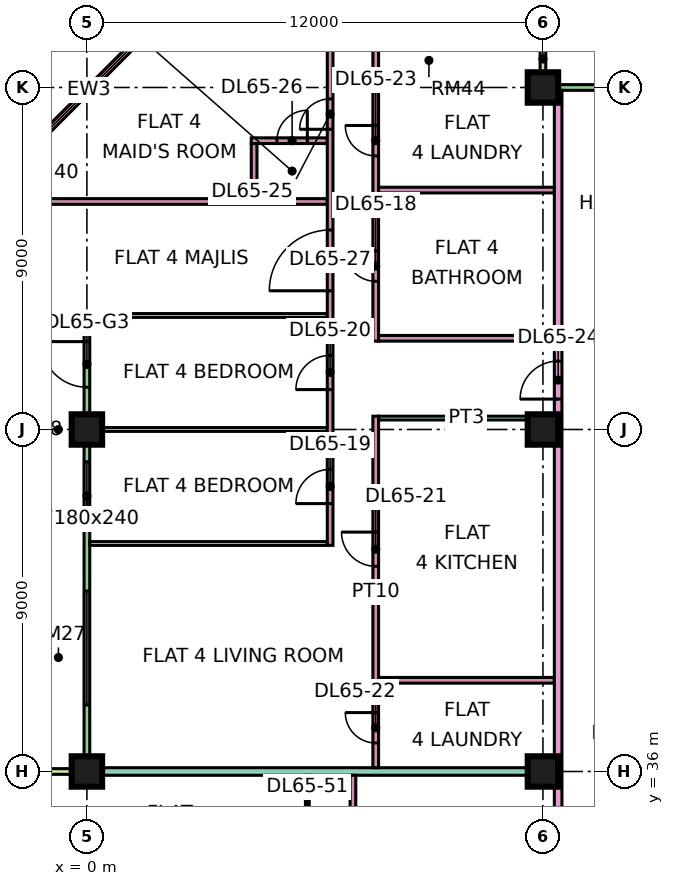
"""IFC4 building model, lengths in metres.
Left out: names, types, materials, properties, quantities, classifications, styles, units other than length and angle.
Written with IfcOpenShell. Run it as: python <this file> out.ifc"""

import sys

from ifc_helpers import new_model, si_unit, direction, frame, frame_2d, origin, origin_2d, place, context, subcontext, project, spatial, rectangle, extrude, element, fill, save


model = new_model("IFC4")
c1 = context("Model", 3, precision=1e-05, world=origin(), true_north=direction((0.0, 1.0)))
c2 = subcontext(c1, "Body", "Model", "MODEL_VIEW")
j1 = project(units=[si_unit("LENGTHUNIT", "METRE"), si_unit("PLANEANGLEUNIT", "RADIAN")], contexts=[c1])
p1 = place(None, origin())
s1 = spatial("IfcSite", under=j1, at=p1, CompositionType="ELEMENT")
p2 = place(p1, origin())
s2 = spatial("IfcBuilding", under=s1, at=p2, CompositionType="ELEMENT")
p3 = place(p2, frame((0.0, 0.0, 280.9)))
s3 = spatial("IfcBuildingStorey", under=s2, at=p3, CompositionType="ELEMENT", Elevation=280.9)
p4 = place(p3, frame((0.0, 36.0, 0.0), z_axis=(0.0, 0.0, 1.0), x_axis=(1.0, 0.0, 0.0)))
e1 = element("IfcColumn", 1, at=p4, inside=s3, PredefinedType="COLUMN", context=c2, shape_type="SweptSolid", body=[
    extrude(rectangle(XDim=0.8, YDim=0.8, at=origin_2d()), origin(), (0.0, 0.0, 1.0), 3.75),
])
for number, where, z_axis, x_axis in (
    (2, (0.0, 45.0, 0.0), (0.0, 0.0, 1.0), (1.0, 0.0, 0.0)),
    (3, (12.0, 36.0, 0.0), (0.0, 0.0, 1.0), (1.0, 0.0, 0.0)),
    (4, (12.0, 45.0, 0.0), (0.0, 0.0, 1.0), (1.0, 0.0, 0.0)),
    (5, (12.0, 54.0, 0.0), (0.0, 0.0, 1.0), (1.0, 0.0, 0.0)),
):
    element("IfcColumn", number, at=place(p3, frame(where, z_axis=z_axis, x_axis=x_axis)), inside=s3, PredefinedType="COLUMN", context=c2, shape_type="SweptSolid", body=[
        extrude(rectangle(XDim=0.8, YDim=0.8, at=origin_2d()), origin(), (0.0, 0.0, 1.0), 3.75),
    ])
p5 = place(p3, frame((22.425, 54.0, 0.0), z_axis=(0.0, 0.0, 1.0), x_axis=(-1.0, 0.0, 0.0)))
e6 = element("IfcWall", 6, at=p5, inside=s3, PredefinedType="SOLIDWALL", context=c2, shape_type="SweptSolid", body=[
    extrude(rectangle(XDim=10.35, YDim=0.15, at=frame_2d((5.175, 0.0))), origin(), (0.0, 0.0, 1.0), 3.35),
])
p6 = place(p5, frame((1.012, 0.0, 0.45)))
e7 = element("IfcOpeningElement", 7, at=p6, cuts=e6, PredefinedType="OPENING", context=c2, shape_type="SweptSolid", body=[
    extrude(rectangle(XDim=4.8, YDim=2.4, at=frame_2d((2.4, 1.2))), frame((0.0, 0.085, 0.0), z_axis=(0.0, -1.0, 0.0), x_axis=(1.0, 0.0, 0.0)), (0.0, 0.0, 1.0), 0.17),
])
p7 = place(p3, frame((12.0, 55.5, 0.0), z_axis=(0.0, 0.0, 1.0), x_axis=(0.0, -1.0, 0.0)))
e8 = element("IfcWall", 8, at=p7, inside=s3, PredefinedType="SOLIDWALL", context=c2, shape_type="SweptSolid", body=[
    extrude(rectangle(XDim=1.5, YDim=0.15, at=frame_2d((0.75, 0.0))), origin(), (0.0, 0.0, 1.0), 3.35),
])
p8 = place(p3, frame((1.553, 55.447, 0.0), z_axis=(0.0, 0.0, 1.0), x_axis=(-0.707106781187, -0.707106781187, 0.0)))
e9 = element("IfcWall", 9, at=p8, inside=s3, PredefinedType="SOLIDWALL", context=c2, shape_type="SweptSolid", body=[
    extrude(rectangle(XDim=4.243, YDim=0.15, at=frame_2d((2.121, 0.0))), origin(), (0.0, 0.0, 1.0), 3.35),
])
p9 = place(p8, frame((0.621, 0.0, 0.45)))
e10 = element("IfcOpeningElement", 10, at=p9, cuts=e9, PredefinedType="OPENING", context=c2, shape_type="SweptSolid", body=[
    extrude(rectangle(XDim=3.0, YDim=2.4, at=frame_2d((1.5, 1.2))), frame((0.0, 0.085, 0.0), z_axis=(0.0, -1.0, 0.0), x_axis=(1.0, 0.0, 0.0)), (0.0, 0.0, 1.0), 0.17),
])
p10 = place(p3, frame((0.0, 47.925, 0.0), z_axis=(0.0, 0.0, 1.0), x_axis=(0.0, -1.0, 0.0)))
e11 = element("IfcWall", 11, at=p10, inside=s3, PredefinedType="SOLIDWALL", context=c2, shape_type="SweptSolid", body=[
    extrude(rectangle(XDim=11.85, YDim=0.15, at=frame_2d((5.925, 0.0))), origin(), (0.0, 0.0, 1.0), 3.35),
])
p11 = place(p10, frame((0.613, 0.0, 0.0)))
e12 = element("IfcOpeningElement", 12, at=p11, cuts=e11, PredefinedType="OPENING", context=c2, shape_type="SweptSolid", body=[
    extrude(rectangle(XDim=1.2, YDim=2.4, at=frame_2d((0.6, 1.2))), frame((0.0, 0.085, 0.0), z_axis=(0.0, -1.0, 0.0), x_axis=(1.0, 0.0, 0.0)), (0.0, 0.0, 1.0), 0.17),
])
p12 = place(p10, frame((3.775, 0.0, 0.45)))
e13 = element("IfcOpeningElement", 13, at=p12, cuts=e11, PredefinedType="OPENING", context=c2, shape_type="SweptSolid", body=[
    extrude(rectangle(XDim=1.8, YDim=2.4, at=frame_2d((0.9, 1.2))), frame((0.0, 0.085, 0.0), z_axis=(0.0, -1.0, 0.0), x_axis=(1.0, 0.0, 0.0)), (0.0, 0.0, 1.0), 0.17),
])
p13 = place(p10, frame((7.175, 0.0, 0.45)))
e14 = element("IfcOpeningElement", 14, at=p13, cuts=e11, PredefinedType="OPENING", context=c2, shape_type="SweptSolid", body=[
    extrude(rectangle(XDim=3.0, YDim=2.4, at=frame_2d((1.5, 1.2))), frame((0.0, 0.085, 0.0), z_axis=(0.0, -1.0, 0.0), x_axis=(1.0, 0.0, 0.0)), (0.0, 0.0, 1.0), 0.17),
])
for number, where, z_axis, x_axis in (
    (15, (-1.5, 48.0, 0.0), (0.0, 0.0, 1.0), (1.0, 0.0, 0.0)),
    (16, (-1.5, 36.0, 0.0), (0.0, 0.0, 1.0), (1.0, 0.0, 0.0)),
):
    element("IfcWall", number, at=place(p3, frame(where, z_axis=z_axis, x_axis=x_axis)), inside=s3, PredefinedType="SOLIDWALL", context=c2, shape_type="SweptSolid", body=[
        extrude(rectangle(XDim=1.5, YDim=0.15, at=frame_2d((0.75, 0.0))), origin(), (0.0, 0.0, 1.0), 3.35),
    ])
p14 = place(p3, frame((-1.351, 51.0, 0.0), z_axis=(0.0, 0.0, 1.0), x_axis=(1.0, 0.0, 0.0)))
e17 = element("IfcWall", 17, at=p14, inside=s3, PredefinedType="PARTITIONING", context=c2, shape_type="SweptSolid", body=[
    extrude(rectangle(XDim=7.676, YDim=0.15, at=frame_2d((3.838, 0.0))), origin(), (0.0, 0.0, 1.0), 3.35),
])
e18 = element("IfcWall", 18, at=p4, inside=s3, PredefinedType="PARTITIONING", context=c2, shape_type="SweptSolid", body=[
    extrude(rectangle(XDim=12.3, YDim=0.2, at=frame_2d((6.15, 0.0))), origin(), (0.0, 0.0, 1.0), 3.35),
])
p15 = place(p3, frame((0.0, 48.0, 0.0), z_axis=(0.0, 0.0, 1.0), x_axis=(1.0, 0.0, 0.0)))
e19 = element("IfcWall", 19, at=p15, inside=s3, PredefinedType="PARTITIONING", context=c2, shape_type="SweptSolid", body=[
    extrude(rectangle(XDim=6.325, YDim=0.1, at=frame_2d((3.163, 0.0))), origin(), (0.0, 0.0, 1.0), 3.35),
])
for number, where, z_axis, x_axis in (
    (20, (0.074, 42.0, 0.0), (0.0, 0.0, 1.0), (1.0, 0.0, 0.0)),
    (21, (0.074, 45.0, 0.0), (0.0, 0.0, 1.0), (1.0, 0.0, 0.0)),
):
    element("IfcWall", number, at=place(p3, frame(where, z_axis=z_axis, x_axis=x_axis)), inside=s3, PredefinedType="PARTITIONING", context=c2, shape_type="SweptSolid", body=[
        extrude(rectangle(XDim=6.251, YDim=0.1, at=frame_2d((3.125, 0.0))), origin(), (0.0, 0.0, 1.0), 3.35),
    ])
p16 = place(p3, frame((4.325, 52.6, 0.0), z_axis=(0.0, 0.0, 1.0), x_axis=(1.0, 0.0, 0.0)))
e22 = element("IfcWall", 22, at=p16, inside=s3, PredefinedType="PARTITIONING", context=c2, shape_type="SweptSolid", body=[
    extrude(rectangle(XDim=2.0, YDim=0.15, at=frame_2d((1.0, 0.0))), origin(), (0.0, 0.0, 1.0), 3.35),
])
p17 = place(p16, frame((0.675, 0.0, 0.0)))
e23 = element("IfcOpeningElement", 23, at=p17, cuts=e22, PredefinedType="OPENING", context=c2, shape_type="SweptSolid", body=[
    extrude(rectangle(XDim=0.8, YDim=2.1, at=frame_2d((0.4, 1.05))), frame((0.0, 0.085, 0.0), z_axis=(0.0, -1.0, 0.0), x_axis=(1.0, 0.0, 0.0)), (0.0, 0.0, 1.0), 0.17),
])
p18 = place(p3, frame((4.4, 51.075, 0.0), z_axis=(0.0, 0.0, 1.0), x_axis=(0.0, 1.0, 0.0)))
e24 = element("IfcWall", 24, at=p18, inside=s3, PredefinedType="PARTITIONING", context=c2, shape_type="SweptSolid", body=[
    extrude(rectangle(XDim=1.45, YDim=0.15, at=frame_2d((0.725, 0.0))), origin(), (0.0, 0.0, 1.0), 3.35),
])
p19 = place(p3, frame((5.8, 29.95, 0.0), z_axis=(0.0, 0.0, 1.0), x_axis=(0.0, 1.0, 0.0)))
e25 = element("IfcWall", 25, at=p19, inside=s3, PredefinedType="PARTITIONING", context=c2, shape_type="SweptSolid", body=[
    extrude(rectangle(XDim=5.95, YDim=0.1, at=frame_2d((2.975, 0.0))), origin(), (0.0, 0.0, 1.0), 3.35),
])
p20 = place(p19, frame((1.1, 0.0, 0.0)))
e26 = element("IfcOpeningElement", 26, at=p20, cuts=e25, PredefinedType="OPENING", context=c2, shape_type="SweptSolid", body=[
    extrude(rectangle(XDim=0.9, YDim=2.1, at=frame_2d((0.45, 1.05))), frame((0.0, 0.06, 0.0), z_axis=(0.0, -1.0, 0.0), x_axis=(1.0, 0.0, 0.0)), (0.0, 0.0, 1.0), 0.12),
])
p21 = place(p19, frame((4.1, 0.0, 0.0)))
e27 = element("IfcOpeningElement", 27, at=p21, cuts=e25, PredefinedType="OPENING", context=c2, shape_type="SweptSolid", body=[
    extrude(rectangle(XDim=0.9, YDim=2.1, at=frame_2d((0.45, 1.05))), frame((0.0, 0.06, 0.0), z_axis=(0.0, -1.0, 0.0), x_axis=(1.0, 0.0, 0.0)), (0.0, 0.0, 1.0), 0.12),
])
p22 = place(p3, frame((6.4, 41.95, 0.0), z_axis=(0.0, 0.0, 1.0), x_axis=(0.0, 1.0, 0.0)))
e28 = element("IfcWall", 28, at=p22, inside=s3, PredefinedType="PARTITIONING", context=c2, shape_type="SweptSolid", body=[
    extrude(rectangle(XDim=13.4, YDim=0.15, at=frame_2d((6.7, 0.0))), origin(), (0.0, 0.0, 1.0), 3.35),
])
p23 = place(p22, frame((1.1, 0.0, 0.0)))
e29 = element("IfcOpeningElement", 29, at=p23, cuts=e28, PredefinedType="OPENING", context=c2, shape_type="SweptSolid", body=[
    extrude(rectangle(XDim=0.9, YDim=2.1, at=frame_2d((0.45, 1.05))), frame((0.0, 0.085, 0.0), z_axis=(0.0, -1.0, 0.0), x_axis=(1.0, 0.0, 0.0)), (0.0, 0.0, 1.0), 0.17),
])
p24 = place(p22, frame((4.1, 0.0, 0.0)))
e30 = element("IfcOpeningElement", 30, at=p24, cuts=e28, PredefinedType="OPENING", context=c2, shape_type="SweptSolid", body=[
    extrude(rectangle(XDim=0.9, YDim=2.1, at=frame_2d((0.45, 1.05))), frame((0.0, 0.085, 0.0), z_axis=(0.0, -1.0, 0.0), x_axis=(1.0, 0.0, 0.0)), (0.0, 0.0, 1.0), 0.17),
])
p25 = place(p22, frame((10.95, 0.0, 0.0)))
e31 = element("IfcOpeningElement", 31, at=p25, cuts=e28, PredefinedType="OPENING", context=c2, shape_type="SweptSolid", body=[
    extrude(rectangle(XDim=0.8, YDim=2.1, at=frame_2d((0.4, 1.05))), frame((0.0, 0.085, 0.0), z_axis=(0.0, -1.0, 0.0), x_axis=(1.0, 0.0, 0.0)), (0.0, 0.0, 1.0), 0.17),
])
p26 = place(p22, frame((6.7, 0.0, 0.0)))
e32 = element("IfcOpeningElement", 32, at=p26, cuts=e28, PredefinedType="OPENING", context=c2, shape_type="SweptSolid", body=[
    extrude(rectangle(XDim=1.6, YDim=2.1, at=frame_2d((0.8, 1.05))), frame((0.0, 0.085, 0.0), z_axis=(0.0, -1.0, 0.0), x_axis=(1.0, 0.0, 0.0)), (0.0, 0.0, 1.0), 0.17),
])
p27 = place(p3, frame((7.0, 27.525, 0.0), z_axis=(0.0, 0.0, 1.0), x_axis=(0.0, 1.0, 0.0)))
e33 = element("IfcWall", 33, at=p27, inside=s3, PredefinedType="PARTITIONING", context=c2, shape_type="SweptSolid", body=[
    extrude(rectangle(XDim=8.375, YDim=0.15, at=frame_2d((4.188, 0.0))), origin(), (0.0, 0.0, 1.0), 3.35),
])
p28 = place(p27, frame((0.525, 0.0, 0.0)))
e34 = element("IfcOpeningElement", 34, at=p28, cuts=e33, PredefinedType="OPENING", context=c2, shape_type="SweptSolid", body=[
    extrude(rectangle(XDim=0.8, YDim=2.1, at=frame_2d((0.4, 1.05))), frame((0.0, 0.085, 0.0), z_axis=(0.0, -1.0, 0.0), x_axis=(1.0, 0.0, 0.0)), (0.0, 0.0, 1.0), 0.17),
])
p29 = place(p27, frame((4.725, 0.0, 0.0)))
e35 = element("IfcOpeningElement", 35, at=p29, cuts=e33, PredefinedType="OPENING", context=c2, shape_type="SweptSolid", body=[
    extrude(rectangle(XDim=0.9, YDim=2.1, at=frame_2d((0.45, 1.05))), frame((0.0, 0.085, 0.0), z_axis=(0.0, -1.0, 0.0), x_axis=(1.0, 0.0, 0.0)), (0.0, 0.0, 1.0), 0.17),
])
p30 = place(p3, frame((7.6, 36.1, 0.0), z_axis=(0.0, 0.0, 1.0), x_axis=(0.0, 1.0, 0.0)))
e36 = element("IfcWall", 36, at=p30, inside=s3, PredefinedType="PARTITIONING", context=c2, shape_type="SweptSolid", body=[
    extrude(rectangle(XDim=9.25, YDim=0.15, at=frame_2d((4.625, 0.0))), origin(), (0.0, 0.0, 1.0), 3.35),
])
p31 = place(p30, frame((5.3, 0.0, 0.0)))
e37 = element("IfcOpeningElement", 37, at=p31, cuts=e36, PredefinedType="OPENING", context=c2, shape_type="SweptSolid", body=[
    extrude(rectangle(XDim=0.9, YDim=2.1, at=frame_2d((0.45, 1.05))), frame((0.0, 0.085, 0.0), z_axis=(0.0, -1.0, 0.0), x_axis=(1.0, 0.0, 0.0)), (0.0, 0.0, 1.0), 0.17),
])
p32 = place(p30, frame((0.65, 0.0, 0.0)))
e38 = element("IfcOpeningElement", 38, at=p32, cuts=e36, PredefinedType="OPENING", context=c2, shape_type="SweptSolid", body=[
    extrude(rectangle(XDim=0.8, YDim=2.1, at=frame_2d((0.4, 1.05))), frame((0.0, 0.085, 0.0), z_axis=(0.0, -1.0, 0.0), x_axis=(1.0, 0.0, 0.0)), (0.0, 0.0, 1.0), 0.17),
])
p33 = place(p3, frame((7.6, 47.325, 0.0), z_axis=(0.0, 0.0, 1.0), x_axis=(0.0, 1.0, 0.0)))
e39 = element("IfcWall", 39, at=p33, inside=s3, PredefinedType="PARTITIONING", context=c2, shape_type="SweptSolid", body=[
    extrude(rectangle(XDim=8.025, YDim=0.15, at=frame_2d((4.013, 0.0))), origin(), (0.0, 0.0, 1.0), 3.35),
])
p34 = place(p33, frame((1.575, 0.0, 0.0)))
e40 = element("IfcOpeningElement", 40, at=p34, cuts=e39, PredefinedType="OPENING", context=c2, shape_type="SweptSolid", body=[
    extrude(rectangle(XDim=0.8, YDim=2.1, at=frame_2d((0.4, 1.05))), frame((0.0, 0.085, 0.0), z_axis=(0.0, -1.0, 0.0), x_axis=(1.0, 0.0, 0.0)), (0.0, 0.0, 1.0), 0.17),
])
p35 = place(p33, frame((4.875, 0.0, 0.0)))
e41 = element("IfcOpeningElement", 41, at=p35, cuts=e39, PredefinedType="OPENING", context=c2, shape_type="SweptSolid", body=[
    extrude(rectangle(XDim=0.8, YDim=2.1, at=frame_2d((0.4, 1.05))), frame((0.0, 0.085, 0.0), z_axis=(0.0, -1.0, 0.0), x_axis=(1.0, 0.0, 0.0)), (0.0, 0.0, 1.0), 0.17),
])
p36 = place(p3, frame((7.675, 38.4, 0.0), z_axis=(0.0, 0.0, 1.0), x_axis=(1.0, 0.0, 0.0)))
e42 = element("IfcWall", 42, at=p36, inside=s3, PredefinedType="PARTITIONING", context=c2, shape_type="SweptSolid", body=[
    extrude(rectangle(XDim=4.625, YDim=0.15, at=frame_2d((2.312, 0.0))), origin(), (0.0, 0.0, 1.0), 3.35),
])
p37 = place(p3, frame((7.675, 45.3, 0.0), z_axis=(0.0, 0.0, 1.0), x_axis=(1.0, 0.0, 0.0)))
e43 = element("IfcWall", 43, at=p37, inside=s3, PredefinedType="PARTITIONING", context=c2, shape_type="SweptSolid", body=[
    extrude(rectangle(XDim=4.625, YDim=0.1, at=frame_2d((2.312, 0.0))), origin(), (0.0, 0.0, 1.0), 3.35),
])
for number, where, z_axis, x_axis in (
    (44, (7.675, 47.4, 0.0), (0.0, 0.0, 1.0), (1.0, 0.0, 0.0)),
    (45, (7.675, 51.3, 0.0), (0.0, 0.0, 1.0), (1.0, 0.0, 0.0)),
):
    element("IfcWall", number, at=place(p3, frame(where, z_axis=z_axis, x_axis=x_axis)), inside=s3, PredefinedType="PARTITIONING", context=c2, shape_type="SweptSolid", body=[
        extrude(rectangle(XDim=4.625, YDim=0.15, at=frame_2d((2.312, 0.0))), origin(), (0.0, 0.0, 1.0), 3.35),
    ])
p38 = place(p3, frame((12.4, 20.0, 0.0), z_axis=(0.0, 0.0, 1.0), x_axis=(0.0, 1.0, 0.0)))
e46 = element("IfcWall", 46, at=p38, inside=s3, PredefinedType="PARTITIONING", context=c2, shape_type="SweptSolid", body=[
    extrude(rectangle(XDim=33.926, YDim=0.2, at=frame_2d((16.963, 0.0))), origin(), (0.0, 0.0, 1.0), 3.35),
])
p39 = place(p38, frame((25.8, 0.0, 0.0)))
e47 = element("IfcOpeningElement", 47, at=p39, cuts=e46, PredefinedType="OPENING", context=c2, shape_type="SweptSolid", body=[
    extrude(rectangle(XDim=1.0, YDim=2.1, at=frame_2d((0.5, 1.05))), frame((0.0, 0.11, 0.0), z_axis=(0.0, -1.0, 0.0), x_axis=(1.0, 0.0, 0.0)), (0.0, 0.0, 1.0), 0.22),
])
p40 = place(p38, frame((0.6, 0.0, 0.0)))
e48 = element("IfcOpeningElement", 48, at=p40, cuts=e46, PredefinedType="OPENING", context=c2, shape_type="SweptSolid", body=[
    extrude(rectangle(XDim=1.2, YDim=2.1, at=frame_2d((0.6, 1.05))), frame((0.0, 0.11, 0.0), z_axis=(0.0, -1.0, 0.0), x_axis=(1.0, 0.0, 0.0)), (0.0, 0.0, 1.0), 0.22),
])
p41 = place(p38, frame((4.5, 0.0, 0.0)))
e49 = element("IfcOpeningElement", 49, at=p41, cuts=e46, PredefinedType="OPENING", context=c2, shape_type="SweptSolid", body=[
    extrude(rectangle(XDim=1.0, YDim=2.1, at=frame_2d((0.5, 1.05))), frame((0.0, 0.11, 0.0), z_axis=(0.0, -1.0, 0.0), x_axis=(1.0, 0.0, 0.0)), (0.0, 0.0, 1.0), 0.22),
])
p42 = place(p9, origin())
e50 = element("IfcWindow", 50, at=p42, inside=s3, PartitioningType="SINGLE_PANEL", PredefinedType="WINDOW", context=c2, shape_type="SweptSolid", body=[
    extrude(rectangle(XDim=3.0, YDim=2.4, at=frame_2d((1.5, 1.2))), frame((0.0, 0.03, 0.0), z_axis=(0.0, -1.0, 0.0), x_axis=(1.0, 0.0, 0.0)), (0.0, 0.0, 1.0), 0.06),
])
fill(e10, e50)
p43 = place(p11, frame((1.2, 0.0, 0.0), z_axis=(0.0, 0.0, 1.0), x_axis=(-1.0, 0.0, 0.0)))
e51 = element("IfcDoor", 51, at=p43, inside=s3, OperationType="DOUBLE_DOOR_SINGLE_SWING", PredefinedType="DOOR", context=c2, shape_type="SweptSolid", body=[
    extrude(rectangle(XDim=1.2, YDim=2.4, at=frame_2d((0.6, 1.2))), frame((0.0, 0.025, 0.0), z_axis=(0.0, -1.0, 0.0), x_axis=(1.0, 0.0, 0.0)), (0.0, 0.0, 1.0), 0.05),
])
fill(e12, e51)
p44 = place(p12, origin())
e52 = element("IfcWindow", 52, at=p44, inside=s3, PartitioningType="SINGLE_PANEL", PredefinedType="WINDOW", context=c2, shape_type="SweptSolid", body=[
    extrude(rectangle(XDim=1.8, YDim=2.4, at=frame_2d((0.9, 1.2))), frame((0.0, 0.03, 0.0), z_axis=(0.0, -1.0, 0.0), x_axis=(1.0, 0.0, 0.0)), (0.0, 0.0, 1.0), 0.06),
])
fill(e13, e52)
p45 = place(p13, origin())
e53 = element("IfcWindow", 53, at=p45, inside=s3, PartitioningType="SINGLE_PANEL", PredefinedType="WINDOW", context=c2, shape_type="SweptSolid", body=[
    extrude(rectangle(XDim=3.0, YDim=2.4, at=frame_2d((1.5, 1.2))), frame((0.0, 0.03, 0.0), z_axis=(0.0, -1.0, 0.0), x_axis=(1.0, 0.0, 0.0)), (0.0, 0.0, 1.0), 0.06),
])
fill(e14, e53)
p46 = place(p34, frame((0.8, 0.0, 0.0), z_axis=(0.0, 0.0, 1.0), x_axis=(-1.0, 0.0, 0.0)))
e54 = element("IfcDoor", 54, at=p46, inside=s3, OperationType="SINGLE_SWING_RIGHT", PredefinedType="DOOR", context=c2, shape_type="SweptSolid", body=[
    extrude(rectangle(XDim=0.8, YDim=2.1, at=frame_2d((0.4, 1.05))), frame((0.0, 0.025, 0.0), z_axis=(0.0, -1.0, 0.0), x_axis=(1.0, 0.0, 0.0)), (0.0, 0.0, 1.0), 0.05),
])
fill(e40, e54)
p47 = place(p23, origin())
e55 = element("IfcDoor", 55, at=p47, inside=s3, OperationType="SINGLE_SWING_LEFT", PredefinedType="DOOR", context=c2, shape_type="SweptSolid", body=[
    extrude(rectangle(XDim=0.9, YDim=2.1, at=frame_2d((0.45, 1.05))), frame((0.0, 0.025, 0.0), z_axis=(0.0, -1.0, 0.0), x_axis=(1.0, 0.0, 0.0)), (0.0, 0.0, 1.0), 0.05),
])
fill(e29, e55)
p48 = place(p24, origin())
e56 = element("IfcDoor", 56, at=p48, inside=s3, OperationType="SINGLE_SWING_LEFT", PredefinedType="DOOR", context=c2, shape_type="SweptSolid", body=[
    extrude(rectangle(XDim=0.9, YDim=2.1, at=frame_2d((0.45, 1.05))), frame((0.0, 0.025, 0.0), z_axis=(0.0, -1.0, 0.0), x_axis=(1.0, 0.0, 0.0)), (0.0, 0.0, 1.0), 0.05),
])
fill(e30, e56)
p49 = place(p31, frame((0.9, 0.0, 0.0), z_axis=(0.0, 0.0, 1.0), x_axis=(-1.0, 0.0, 0.0)))
e57 = element("IfcDoor", 57, at=p49, inside=s3, OperationType="SINGLE_SWING_RIGHT", PredefinedType="DOOR", context=c2, shape_type="SweptSolid", body=[
    extrude(rectangle(XDim=0.9, YDim=2.1, at=frame_2d((0.45, 1.05))), frame((0.0, 0.025, 0.0), z_axis=(0.0, -1.0, 0.0), x_axis=(1.0, 0.0, 0.0)), (0.0, 0.0, 1.0), 0.05),
])
fill(e37, e57)
p50 = place(p32, frame((0.8, 0.0, 0.0), z_axis=(0.0, 0.0, 1.0), x_axis=(-1.0, 0.0, 0.0)))
e58 = element("IfcDoor", 58, at=p50, inside=s3, OperationType="SINGLE_SWING_RIGHT", PredefinedType="DOOR", context=c2, shape_type="SweptSolid", body=[
    extrude(rectangle(XDim=0.8, YDim=2.1, at=frame_2d((0.4, 1.05))), frame((0.0, 0.025, 0.0), z_axis=(0.0, -1.0, 0.0), x_axis=(1.0, 0.0, 0.0)), (0.0, 0.0, 1.0), 0.05),
])
fill(e38, e58)
p51 = place(p35, frame((0.8, 0.0, 0.0), z_axis=(0.0, 0.0, 1.0), x_axis=(-1.0, 0.0, 0.0)))
e59 = element("IfcDoor", 59, at=p51, inside=s3, OperationType="SINGLE_SWING_RIGHT", PredefinedType="DOOR", context=c2, shape_type="SweptSolid", body=[
    extrude(rectangle(XDim=0.8, YDim=2.1, at=frame_2d((0.4, 1.05))), frame((0.0, 0.025, 0.0), z_axis=(0.0, -1.0, 0.0), x_axis=(1.0, 0.0, 0.0)), (0.0, 0.0, 1.0), 0.05),
])
fill(e41, e59)
p52 = place(p39, origin())
e60 = element("IfcDoor", 60, at=p52, inside=s3, OperationType="SINGLE_SWING_LEFT", PredefinedType="DOOR", context=c2, shape_type="SweptSolid", body=[
    extrude(rectangle(XDim=1.0, YDim=2.1, at=frame_2d((0.5, 1.05))), frame((0.0, 0.025, 0.0), z_axis=(0.0, -1.0, 0.0), x_axis=(1.0, 0.0, 0.0)), (0.0, 0.0, 1.0), 0.05),
])
fill(e47, e60)
p53 = place(p25, origin())
e61 = element("IfcDoor", 61, at=p53, inside=s3, OperationType="SINGLE_SWING_LEFT", PredefinedType="DOOR", context=c2, shape_type="SweptSolid", body=[
    extrude(rectangle(XDim=0.8, YDim=2.1, at=frame_2d((0.4, 1.05))), frame((0.0, 0.025, 0.0), z_axis=(0.0, -1.0, 0.0), x_axis=(1.0, 0.0, 0.0)), (0.0, 0.0, 1.0), 0.05),
])
fill(e31, e61)
p54 = place(p17, frame((0.8, 0.0, 0.0), z_axis=(0.0, 0.0, 1.0), x_axis=(-1.0, 0.0, 0.0)))
e62 = element("IfcDoor", 62, at=p54, inside=s3, OperationType="SINGLE_SWING_RIGHT", PredefinedType="DOOR", context=c2, shape_type="SweptSolid", body=[
    extrude(rectangle(XDim=0.8, YDim=2.1, at=frame_2d((0.4, 1.05))), frame((0.0, 0.025, 0.0), z_axis=(0.0, -1.0, 0.0), x_axis=(1.0, 0.0, 0.0)), (0.0, 0.0, 1.0), 0.05),
])
fill(e23, e62)
p55 = place(p26, origin())
e63 = element("IfcDoor", 63, at=p55, inside=s3, OperationType="DOUBLE_DOOR_SINGLE_SWING", PredefinedType="DOOR", context=c2, shape_type="SweptSolid", body=[
    extrude(rectangle(XDim=1.6, YDim=2.1, at=frame_2d((0.8, 1.05))), frame((0.0, 0.025, 0.0), z_axis=(0.0, -1.0, 0.0), x_axis=(1.0, 0.0, 0.0)), (0.0, 0.0, 1.0), 0.05),
])
fill(e32, e63)
save(model, sys.argv[1])
